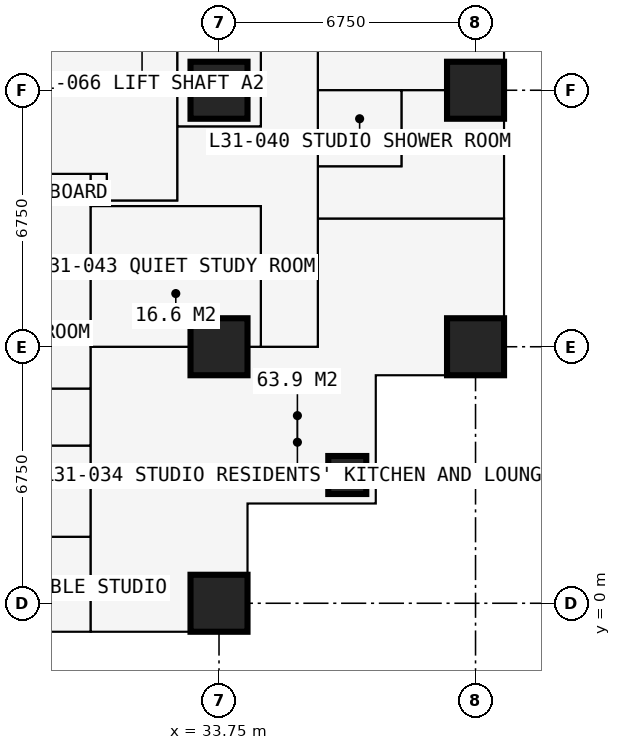
"""IFC4 building model, lengths in metres.
Left out: names, types, materials, properties, quantities, classifications, styles, units other than length and angle.
Written with IfcOpenShell. Run it as: python <this file> out.ifc"""

import sys

from ifc_helpers import new_model, si_unit, direction, frame, frame_2d, origin, origin_2d, place, context, subcontext, project, spatial, rectangle, extrude, element, fill, save


model = new_model("IFC4")
c1 = context("Model", 3, precision=1e-05, world=origin(), true_north=direction((0.0, 1.0)))
c2 = subcontext(c1, "Body", "Model", "MODEL_VIEW")
j1 = project(units=[si_unit("LENGTHUNIT", "METRE"), si_unit("PLANEANGLEUNIT", "RADIAN")], contexts=[c1])
p1 = place(None, origin())
s1 = spatial("IfcSite", under=j1, at=p1, CompositionType="ELEMENT")
p2 = place(p1, origin())
s2 = spatial("IfcBuilding", under=s1, at=p2, CompositionType="ELEMENT")
p3 = place(p2, frame((0.0, 0.0, 116.1)))
s3 = spatial("IfcBuildingStorey", under=s2, at=p3, CompositionType="ELEMENT", Elevation=116.1)
for number, where, z_axis, x_axis in (
    (1, (33.75, 0.0, 0.0), (0.0, 0.0, 1.0), (1.0, 0.0, 0.0)),
    (2, (33.75, 6.75, 0.0), (0.0, 0.0, 1.0), (1.0, 0.0, 0.0)),
    (3, (33.75, 13.5, 0.0), (0.0, 0.0, 1.0), (1.0, 0.0, 0.0)),
):
    element("IfcColumn", number, at=place(p3, frame(where, z_axis=z_axis, x_axis=x_axis)), inside=s3, PredefinedType="COLUMN", context=c2, shape_type="SweptSolid", body=[
        extrude(rectangle(XDim=1.5, YDim=1.5, at=origin_2d()), origin(), (0.0, 0.0, 1.0), 3.6),
    ])
p4 = place(p3, frame((37.125, 3.375, 0.0), z_axis=(0.0, 0.0, 1.0), x_axis=(1.0, 0.0, 0.0)))
e4 = element("IfcColumn", 4, at=p4, inside=s3, PredefinedType="COLUMN", context=c2, shape_type="SweptSolid", body=[
    extrude(rectangle(XDim=1.0, YDim=1.0, at=origin_2d()), origin(), (0.0, 0.0, 1.0), 3.6),
])
for number, where, z_axis, x_axis in (
    (5, (40.5, 6.75, 0.0), (0.0, 0.0, 1.0), (1.0, 0.0, 0.0)),
    (6, (40.5, 13.5, 0.0), (0.0, 0.0, 1.0), (1.0, 0.0, 0.0)),
):
    element("IfcColumn", number, at=place(p3, frame(where, z_axis=z_axis, x_axis=x_axis)), inside=s3, PredefinedType="COLUMN", context=c2, shape_type="SweptSolid", body=[
        extrude(rectangle(XDim=1.5, YDim=1.5, at=origin_2d()), origin(), (0.0, 0.0, 1.0), 3.6),
    ])
p5 = place(p3, frame((41.25, 20.25, 0.0), z_axis=(0.0, 0.0, 1.0), x_axis=(0.0, -1.0, 0.0)))
e7 = element("IfcWall", 7, at=p5, inside=s3, PredefinedType="SOLIDWALL", context=c2, shape_type="SweptSolid", body=[
    extrude(rectangle(XDim=6.75, YDim=0.15, at=frame_2d((3.375, 0.0))), origin(), (0.0, 0.0, 1.0), 3.375),
])
p6 = place(p5, frame((0.863, 0.0, 0.0)))
e8 = element("IfcOpeningElement", 8, at=p6, cuts=e7, PredefinedType="OPENING", context=c2, shape_type="SweptSolid", body=[
    extrude(rectangle(XDim=1.0, YDim=2.2, at=frame_2d((0.5, 1.1))), frame((0.0, 0.085, 0.0), z_axis=(0.0, -1.0, 0.0), x_axis=(1.0, 0.0, 0.0)), (0.0, 0.0, 1.0), 0.17),
])
p7 = place(p5, frame((1.975, 0.0, 0.9)))
e9 = element("IfcOpeningElement", 9, at=p7, cuts=e7, PredefinedType="OPENING", context=c2, shape_type="SweptSolid", body=[
    extrude(rectangle(XDim=1.2, YDim=1.8, at=frame_2d((0.6, 0.9))), frame((0.0, 0.085, 0.0), z_axis=(0.0, -1.0, 0.0), x_axis=(1.0, 0.0, 0.0)), (0.0, 0.0, 1.0), 0.17),
])
p8 = place(p5, frame((4.887, 0.0, 0.0)))
e10 = element("IfcOpeningElement", 10, at=p8, cuts=e7, PredefinedType="OPENING", context=c2, shape_type="SweptSolid", body=[
    extrude(rectangle(XDim=1.0, YDim=2.2, at=frame_2d((0.5, 1.1))), frame((0.0, 0.085, 0.0), z_axis=(0.0, -1.0, 0.0), x_axis=(1.0, 0.0, 0.0)), (0.0, 0.0, 1.0), 0.17),
])
p9 = place(p5, frame((3.575, 0.0, 0.9)))
e11 = element("IfcOpeningElement", 11, at=p9, cuts=e7, PredefinedType="OPENING", context=c2, shape_type="SweptSolid", body=[
    extrude(rectangle(XDim=1.2, YDim=1.8, at=frame_2d((0.6, 0.9))), frame((0.0, 0.085, 0.0), z_axis=(0.0, -1.0, 0.0), x_axis=(1.0, 0.0, 0.0)), (0.0, 0.0, 1.0), 0.17),
])
p10 = place(p3, frame((34.5, -0.75, 0.0), z_axis=(0.0, 0.0, 1.0), x_axis=(0.0, 1.0, 0.0)))
e12 = element("IfcWall", 12, at=p10, inside=s3, PredefinedType="SOLIDWALL", context=c2, shape_type="SweptSolid", body=[
    extrude(rectangle(XDim=3.375, YDim=0.3, at=frame_2d((1.688, 0.0))), origin(), (0.0, 0.0, 1.0), 3.375),
])
p11 = place(p10, frame((1.607, 0.0, 0.9)))
e13 = element("IfcOpeningElement", 13, at=p11, cuts=e12, PredefinedType="OPENING", context=c2, shape_type="SweptSolid", body=[
    extrude(rectangle(XDim=1.5, YDim=1.8, at=frame_2d((0.75, 0.9))), frame((0.0, 0.16, 0.0), z_axis=(0.0, -1.0, 0.0), x_axis=(1.0, 0.0, 0.0)), (0.0, 0.0, 1.0), 0.32),
])
p12 = place(p3, frame((34.5, 2.625, 0.0), z_axis=(0.0, 0.0, 1.0), x_axis=(1.0, 0.0, 0.0)))
e14 = element("IfcWall", 14, at=p12, inside=s3, PredefinedType="SOLIDWALL", context=c2, shape_type="SweptSolid", body=[
    extrude(rectangle(XDim=3.375, YDim=0.3, at=frame_2d((1.688, 0.0))), origin(), (0.0, 0.0, 1.0), 3.375),
])
p13 = place(p12, frame((0.788, 0.0, 0.6)))
e15 = element("IfcOpeningElement", 15, at=p13, cuts=e14, PredefinedType="OPENING", context=c2, shape_type="SweptSolid", body=[
    extrude(rectangle(XDim=1.8, YDim=2.1, at=frame_2d((0.9, 1.05))), frame((0.0, 0.16, 0.0), z_axis=(0.0, -1.0, 0.0), x_axis=(1.0, 0.0, 0.0)), (0.0, 0.0, 1.0), 0.32),
])
p14 = place(p3, frame((37.875, 2.625, 0.0), z_axis=(0.0, 0.0, 1.0), x_axis=(0.0, 1.0, 0.0)))
e16 = element("IfcWall", 16, at=p14, inside=s3, PredefinedType="SOLIDWALL", context=c2, shape_type="SweptSolid", body=[
    extrude(rectangle(XDim=3.375, YDim=0.3, at=frame_2d((1.688, 0.0))), origin(), (0.0, 0.0, 1.0), 3.375),
])
p15 = place(p14, frame((0.788, 0.0, 0.6)))
e17 = element("IfcOpeningElement", 17, at=p15, cuts=e16, PredefinedType="OPENING", context=c2, shape_type="SweptSolid", body=[
    extrude(rectangle(XDim=1.8, YDim=2.1, at=frame_2d((0.9, 1.05))), frame((0.0, 0.16, 0.0), z_axis=(0.0, -1.0, 0.0), x_axis=(1.0, 0.0, 0.0)), (0.0, 0.0, 1.0), 0.32),
])
p16 = place(p3, frame((37.875, 6.0, 0.0), z_axis=(0.0, 0.0, 1.0), x_axis=(1.0, 0.0, 0.0)))
e18 = element("IfcWall", 18, at=p16, inside=s3, PredefinedType="SOLIDWALL", context=c2, shape_type="SweptSolid", body=[
    extrude(rectangle(XDim=3.375, YDim=0.3, at=frame_2d((1.688, 0.0))), origin(), (0.0, 0.0, 1.0), 3.375),
])
p17 = place(p16, frame((0.268, 0.0, 0.9)))
e19 = element("IfcOpeningElement", 19, at=p17, cuts=e18, PredefinedType="OPENING", context=c2, shape_type="SweptSolid", body=[
    extrude(rectangle(XDim=1.5, YDim=1.8, at=frame_2d((0.75, 0.9))), frame((0.0, 0.16, 0.0), z_axis=(0.0, -1.0, 0.0), x_axis=(1.0, 0.0, 0.0)), (0.0, 0.0, 1.0), 0.32),
])
p18 = place(p3, frame((6.75, 4.15, 0.0), z_axis=(0.0, 0.0, 1.0), x_axis=(1.0, 0.0, 0.0)))
e20 = element("IfcWall", 20, at=p18, inside=s3, PredefinedType="PARTITIONING", context=c2, shape_type="SweptSolid", body=[
    extrude(rectangle(XDim=23.625, YDim=0.1, at=frame_2d((11.812, 0.0))), origin(), (0.0, 0.0, 1.0), 3.375),
])
p19 = place(p18, frame((0.2, 0.0, 0.0)))
e21 = element("IfcOpeningElement", 21, at=p19, cuts=e20, PredefinedType="OPENING", context=c2, shape_type="SweptSolid", body=[
    extrude(rectangle(XDim=0.95, YDim=2.2, at=frame_2d((0.475, 1.1))), frame((0.0, 0.06, 0.0), z_axis=(0.0, -1.0, 0.0), x_axis=(1.0, 0.0, 0.0)), (0.0, 0.0, 1.0), 0.12),
])
p20 = place(p18, frame((3.625, 0.0, 0.0)))
e22 = element("IfcOpeningElement", 22, at=p20, cuts=e20, PredefinedType="OPENING", context=c2, shape_type="SweptSolid", body=[
    extrude(rectangle(XDim=0.95, YDim=2.2, at=frame_2d((0.475, 1.1))), frame((0.0, 0.06, 0.0), z_axis=(0.0, -1.0, 0.0), x_axis=(1.0, 0.0, 0.0)), (0.0, 0.0, 1.0), 0.12),
])
p21 = place(p18, frame((7.0, 0.0, 0.0)))
e23 = element("IfcOpeningElement", 23, at=p21, cuts=e20, PredefinedType="OPENING", context=c2, shape_type="SweptSolid", body=[
    extrude(rectangle(XDim=0.95, YDim=2.2, at=frame_2d((0.475, 1.1))), frame((0.0, 0.06, 0.0), z_axis=(0.0, -1.0, 0.0), x_axis=(1.0, 0.0, 0.0)), (0.0, 0.0, 1.0), 0.12),
])
p22 = place(p18, frame((10.375, 0.0, 0.0)))
e24 = element("IfcOpeningElement", 24, at=p22, cuts=e20, PredefinedType="OPENING", context=c2, shape_type="SweptSolid", body=[
    extrude(rectangle(XDim=0.95, YDim=2.2, at=frame_2d((0.475, 1.1))), frame((0.0, 0.06, 0.0), z_axis=(0.0, -1.0, 0.0), x_axis=(1.0, 0.0, 0.0)), (0.0, 0.0, 1.0), 0.12),
])
p23 = place(p18, frame((18.475, 0.0, 0.0)))
e25 = element("IfcOpeningElement", 25, at=p23, cuts=e20, PredefinedType="OPENING", context=c2, shape_type="SweptSolid", body=[
    extrude(rectangle(XDim=0.95, YDim=2.2, at=frame_2d((0.475, 1.1))), frame((0.0, 0.06, 0.0), z_axis=(0.0, -1.0, 0.0), x_axis=(1.0, 0.0, 0.0)), (0.0, 0.0, 1.0), 0.12),
])
p24 = place(p18, frame((13.7, 0.0, 0.0)))
e26 = element("IfcOpeningElement", 26, at=p24, cuts=e20, PredefinedType="OPENING", context=c2, shape_type="SweptSolid", body=[
    extrude(rectangle(XDim=0.95, YDim=2.2, at=frame_2d((0.475, 1.1))), frame((0.0, 0.06, 0.0), z_axis=(0.0, -1.0, 0.0), x_axis=(1.0, 0.0, 0.0)), (0.0, 0.0, 1.0), 0.12),
])
p25 = place(p3, frame((10.125, 11.3, 0.0), z_axis=(0.0, 0.0, 1.0), x_axis=(1.0, 0.0, 0.0)))
e27 = element("IfcWall", 27, at=p25, inside=s3, PredefinedType="PARTITIONING", context=c2, shape_type="SweptSolid", body=[
    extrude(rectangle(XDim=20.675, YDim=0.15, at=frame_2d((10.337, 0.0))), origin(), (0.0, 0.0, 1.0), 3.375),
])
p26 = place(p25, frame((8.375, 0.0, 0.0)))
e28 = element("IfcOpeningElement", 28, at=p26, cuts=e27, PredefinedType="OPENING", context=c2, shape_type="SweptSolid", body=[
    extrude(rectangle(XDim=1.0, YDim=2.2, at=frame_2d((0.5, 1.1))), frame((0.0, 0.085, 0.0), z_axis=(0.0, -1.0, 0.0), x_axis=(1.0, 0.0, 0.0)), (0.0, 0.0, 1.0), 0.17),
])
p27 = place(p25, frame((10.975, 0.0, 0.0)))
e29 = element("IfcOpeningElement", 29, at=p27, cuts=e27, PredefinedType="OPENING", context=c2, shape_type="SweptSolid", body=[
    extrude(rectangle(XDim=1.0, YDim=2.2, at=frame_2d((0.5, 1.1))), frame((0.0, 0.085, 0.0), z_axis=(0.0, -1.0, 0.0), x_axis=(1.0, 0.0, 0.0)), (0.0, 0.0, 1.0), 0.17),
])
p28 = place(p25, frame((3.925, 0.0, 0.0)))
e30 = element("IfcOpeningElement", 30, at=p28, cuts=e27, PredefinedType="OPENING", context=c2, shape_type="SweptSolid", body=[
    extrude(rectangle(XDim=0.95, YDim=2.2, at=frame_2d((0.475, 1.1))), frame((0.0, 0.085, 0.0), z_axis=(0.0, -1.0, 0.0), x_axis=(1.0, 0.0, 0.0)), (0.0, 0.0, 1.0), 0.17),
])
p29 = place(p3, frame((22.988, 5.65, 0.0), z_axis=(0.0, 0.0, 1.0), x_axis=(1.0, 0.0, 0.0)))
e31 = element("IfcWall", 31, at=p29, inside=s3, PredefinedType="PARTITIONING", context=c2, shape_type="SweptSolid", body=[
    extrude(rectangle(XDim=7.387, YDim=0.15, at=frame_2d((3.694, 0.0))), origin(), (0.0, 0.0, 1.0), 3.375),
])
p30 = place(p29, frame((2.3, 0.0, 0.0)))
e32 = element("IfcOpeningElement", 32, at=p30, cuts=e31, PredefinedType="OPENING", context=c2, shape_type="SweptSolid", body=[
    extrude(rectangle(XDim=0.95, YDim=2.2, at=frame_2d((0.475, 1.1))), frame((0.0, 0.085, 0.0), z_axis=(0.0, -1.0, 0.0), x_axis=(1.0, 0.0, 0.0)), (0.0, 0.0, 1.0), 0.17),
])
p31 = place(p3, frame((27.775, 1.75, 0.0), z_axis=(0.0, 0.0, 1.0), x_axis=(1.0, 0.0, 0.0)))
e33 = element("IfcWall", 33, at=p31, inside=s3, PredefinedType="PARTITIONING", context=c2, shape_type="SweptSolid", body=[
    extrude(rectangle(XDim=2.6, YDim=0.1, at=frame_2d((1.3, 0.0))), origin(), (0.0, 0.0, 1.0), 3.375),
])
p32 = place(p31, frame((0.85, 0.0, 0.0)))
e34 = element("IfcOpeningElement", 34, at=p32, cuts=e33, PredefinedType="OPENING", context=c2, shape_type="SweptSolid", body=[
    extrude(rectangle(XDim=0.9, YDim=2.2, at=frame_2d((0.45, 1.1))), frame((0.0, 0.06, 0.0), z_axis=(0.0, -1.0, 0.0), x_axis=(1.0, 0.0, 0.0)), (0.0, 0.0, 1.0), 0.12),
])
p33 = place(p3, frame((30.375, -0.734, 0.0), z_axis=(0.0, 0.0, 1.0), x_axis=(0.0, 1.0, 0.0)))
e35 = element("IfcWall", 35, at=p33, inside=s3, PredefinedType="PARTITIONING", context=c2, shape_type="SweptSolid", body=[
    extrude(rectangle(XDim=12.034, YDim=0.15, at=frame_2d((6.017, 0.0))), origin(), (0.0, 0.0, 1.0), 3.375),
])
p34 = place(p33, frame((5.134, 0.0, 0.0)))
e36 = element("IfcOpeningElement", 36, at=p34, cuts=e35, PredefinedType="OPENING", context=c2, shape_type="SweptSolid", body=[
    extrude(rectangle(XDim=1.0, YDim=2.2, at=frame_2d((0.5, 1.1))), frame((0.0, 0.085, 0.0), z_axis=(0.0, -1.0, 0.0), x_axis=(1.0, 0.0, 0.0)), (0.0, 0.0, 1.0), 0.17),
])
p35 = place(p3, frame((30.375, 6.75, 0.0), z_axis=(0.0, 0.0, 1.0), x_axis=(1.0, 0.0, 0.0)))
e37 = element("IfcWall", 37, at=p35, inside=s3, PredefinedType="PARTITIONING", context=c2, shape_type="SweptSolid", body=[
    extrude(rectangle(XDim=5.975, YDim=0.15, at=frame_2d((2.988, 0.0))), origin(), (0.0, 0.0, 1.0), 2.877),
])
p36 = place(p3, frame((30.375, 10.45, 0.0), z_axis=(0.0, 0.0, 1.0), x_axis=(1.0, 0.0, 0.0)))
e38 = element("IfcWall", 38, at=p36, inside=s3, PredefinedType="PARTITIONING", context=c2, shape_type="SweptSolid", body=[
    extrude(rectangle(XDim=4.475, YDim=0.15, at=frame_2d((2.238, 0.0))), origin(), (0.0, 0.0, 1.0), 3.375),
])
p37 = place(p36, frame((2.35, 0.0, 0.0)))
e39 = element("IfcOpeningElement", 39, at=p37, cuts=e38, PredefinedType="OPENING", context=c2, shape_type="SweptSolid", body=[
    extrude(rectangle(XDim=0.95, YDim=2.2, at=frame_2d((0.475, 1.1))), frame((0.0, 0.085, 0.0), z_axis=(0.0, -1.0, 0.0), x_axis=(1.0, 0.0, 0.0)), (0.0, 0.0, 1.0), 0.17),
])
p38 = place(p3, frame((30.8, 10.6, 0.0), z_axis=(0.0, 0.0, 1.0), x_axis=(0.0, 1.0, 0.0)))
e40 = element("IfcWall", 40, at=p38, inside=s3, PredefinedType="PARTITIONING", context=c2, shape_type="SweptSolid", body=[
    extrude(rectangle(XDim=0.7, YDim=0.15, at=frame_2d((0.35, 0.0))), origin(), (0.0, 0.0, 1.0), 3.375),
])
p39 = place(p3, frame((30.8, 10.6, 0.0), z_axis=(0.0, 0.0, 1.0), x_axis=(1.0, 0.0, 0.0)))
e41 = element("IfcWall", 41, at=p39, inside=s3, PredefinedType="PARTITIONING", context=c2, shape_type="SweptSolid", body=[
    extrude(rectangle(XDim=1.85, YDim=0.15, at=frame_2d((0.925, 0.0))), origin(), (0.0, 0.0, 1.0), 3.375),
])
p40 = place(p3, frame((32.65, 10.6, 0.0), z_axis=(0.0, 0.0, 1.0), x_axis=(0.0, 1.0, 0.0)))
e42 = element("IfcWall", 42, at=p40, inside=s3, PredefinedType="SHEAR", context=c2, shape_type="SweptSolid", body=[
    extrude(rectangle(XDim=9.3, YDim=0.1, at=frame_2d((4.65, 0.0))), origin(), (0.0, 0.0, 1.0), 3.375),
])
p41 = place(p40, frame((0.5, 0.0, 0.0)))
e43 = element("IfcOpeningElement", 43, at=p41, cuts=e42, PredefinedType="OPENING", context=c2, shape_type="SweptSolid", body=[
    extrude(rectangle(XDim=1.0, YDim=2.2, at=frame_2d((0.5, 1.1))), frame((0.0, 0.06, 0.0), z_axis=(0.0, -1.0, 0.0), x_axis=(1.0, 0.0, 0.0)), (0.0, 0.0, 1.0), 0.12),
])
p42 = place(p3, frame((32.65, 12.55, 0.0), z_axis=(0.0, 0.0, 1.0), x_axis=(1.0, 0.0, 0.0)))
e44 = element("IfcWall", 44, at=p42, inside=s3, PredefinedType="PARTITIONING", context=c2, shape_type="SweptSolid", body=[
    extrude(rectangle(XDim=2.2, YDim=0.15, at=frame_2d((1.1, 0.0))), origin(), (0.0, 0.0, 1.0), 3.375),
])
p43 = place(p3, frame((34.85, 6.75, 0.0), z_axis=(0.0, 0.0, 1.0), x_axis=(0.0, 1.0, 0.0)))
e45 = element("IfcWall", 45, at=p43, inside=s3, PredefinedType="PARTITIONING", context=c2, shape_type="SweptSolid", body=[
    extrude(rectangle(XDim=3.7, YDim=0.15, at=frame_2d((1.85, 0.0))), origin(), (0.0, 0.0, 1.0), 3.375),
])
p44 = place(p3, frame((34.85, 12.55, 0.0), z_axis=(0.0, 0.0, 1.0), x_axis=(0.0, 1.0, 0.0)))
e46 = element("IfcWall", 46, at=p44, inside=s3, PredefinedType="PARTITIONING", context=c2, shape_type="SweptSolid", body=[
    extrude(rectangle(XDim=17.825, YDim=0.15, at=frame_2d((8.913, 0.0))), origin(), (0.0, 0.0, 1.0), 3.375),
])
p45 = place(p44, frame((8.5, 0.0, 0.0)))
e47 = element("IfcOpeningElement", 47, at=p45, cuts=e46, PredefinedType="OPENING", context=c2, shape_type="SweptSolid", body=[
    extrude(rectangle(XDim=0.95, YDim=2.2, at=frame_2d((0.475, 1.1))), frame((0.0, 0.085, 0.0), z_axis=(0.0, -1.0, 0.0), x_axis=(1.0, 0.0, 0.0)), (0.0, 0.0, 1.0), 0.17),
])
p46 = place(p3, frame((36.35, 6.75, 0.0), z_axis=(0.0, 0.0, 1.0), x_axis=(0.0, 1.0, 0.0)))
e48 = element("IfcWall", 48, at=p46, inside=s3, PredefinedType="PARTITIONING", context=c2, shape_type="SweptSolid", body=[
    extrude(rectangle(XDim=20.25, YDim=0.15, at=frame_2d((10.125, 0.0))), origin(), (0.0, 0.0, 1.0), 3.375),
])
p47 = place(p46, frame((15.1, 0.0, 0.0)))
e49 = element("IfcOpeningElement", 49, at=p47, cuts=e48, PredefinedType="OPENING", context=c2, shape_type="SweptSolid", body=[
    extrude(rectangle(XDim=0.95, YDim=2.2, at=frame_2d((0.475, 1.1))), frame((0.0, 0.085, 0.0), z_axis=(0.0, -1.0, 0.0), x_axis=(1.0, 0.0, 0.0)), (0.0, 0.0, 1.0), 0.17),
])
p48 = place(p46, frame((8.35, 0.0, 0.0)))
e50 = element("IfcOpeningElement", 50, at=p48, cuts=e48, PredefinedType="OPENING", context=c2, shape_type="SweptSolid", body=[
    extrude(rectangle(XDim=0.95, YDim=2.2, at=frame_2d((0.475, 1.1))), frame((0.0, 0.085, 0.0), z_axis=(0.0, -1.0, 0.0), x_axis=(1.0, 0.0, 0.0)), (0.0, 0.0, 1.0), 0.17),
])
p49 = place(p46, frame((3.575, 0.0, 0.0)))
e51 = element("IfcOpeningElement", 51, at=p49, cuts=e48, PredefinedType="OPENING", context=c2, shape_type="SweptSolid", body=[
    extrude(rectangle(XDim=0.95, YDim=2.2, at=frame_2d((0.475, 1.1))), frame((0.0, 0.085, 0.0), z_axis=(0.0, -1.0, 0.0), x_axis=(1.0, 0.0, 0.0)), (0.0, 0.0, 1.0), 0.17),
])
p50 = place(p3, frame((36.35, 10.125, 0.0), z_axis=(0.0, 0.0, 1.0), x_axis=(1.0, 0.0, 0.0)))
e52 = element("IfcWall", 52, at=p50, inside=s3, PredefinedType="PARTITIONING", context=c2, shape_type="SweptSolid", body=[
    extrude(rectangle(XDim=4.884, YDim=0.15, at=frame_2d((2.442, 0.0))), origin(), (0.0, 0.0, 1.0), 3.375),
])
p51 = place(p3, frame((36.35, 11.5, 0.0), z_axis=(0.0, 0.0, 1.0), x_axis=(1.0, 0.0, 0.0)))
e53 = element("IfcWall", 53, at=p51, inside=s3, PredefinedType="PARTITIONING", context=c2, shape_type="SweptSolid", body=[
    extrude(rectangle(XDim=2.2, YDim=0.1, at=frame_2d((1.1, 0.0))), origin(), (0.0, 0.0, 1.0), 3.375),
])
p52 = place(p3, frame((36.35, 13.5, 0.0), z_axis=(0.0, 0.0, 1.0), x_axis=(1.0, 0.0, 0.0)))
e54 = element("IfcWall", 54, at=p52, inside=s3, PredefinedType="PARTITIONING", context=c2, shape_type="SweptSolid", body=[
    extrude(rectangle(XDim=4.884, YDim=0.175, at=frame_2d((2.442, 0.0))), origin(), (0.0, 0.0, 1.0), 2.877),
])
p53 = place(p52, frame((0.65, 0.0, 0.0)))
e55 = element("IfcOpeningElement", 55, at=p53, cuts=e54, PredefinedType="OPENING", context=c2, shape_type="SweptSolid", body=[
    extrude(rectangle(XDim=0.9, YDim=2.2, at=frame_2d((0.45, 1.1))), frame((0.0, 0.097, 0.0), z_axis=(0.0, -1.0, 0.0), x_axis=(1.0, 0.0, 0.0)), (0.0, 0.0, 1.0), 0.195),
])
p54 = place(p3, frame((38.55, 11.5, 0.0), z_axis=(0.0, 0.0, 1.0), x_axis=(0.0, 1.0, 0.0)))
e56 = element("IfcWall", 56, at=p54, inside=s3, PredefinedType="PARTITIONING", context=c2, shape_type="SweptSolid", body=[
    extrude(rectangle(XDim=2.0, YDim=0.1, at=frame_2d((1.0, 0.0))), origin(), (0.0, 0.0, 1.0), 3.375),
])
p55 = place(p8, origin())
e57 = element("IfcDoor", 57, at=p55, inside=s3, OperationType="SINGLE_SWING_RIGHT", PredefinedType="DOOR", context=c2, shape_type="SweptSolid", body=[
    extrude(rectangle(XDim=1.0, YDim=2.2, at=frame_2d((0.5, 1.1))), frame((0.0, 0.025, 0.0), z_axis=(0.0, -1.0, 0.0), x_axis=(1.0, 0.0, 0.0)), (0.0, 0.0, 1.0), 0.05),
])
fill(e10, e57)
p56 = place(p11, origin())
e58 = element("IfcWindow", 58, at=p56, inside=s3, PartitioningType="SINGLE_PANEL", PredefinedType="WINDOW", context=c2, shape_type="SweptSolid", body=[
    extrude(rectangle(XDim=1.5, YDim=1.8, at=frame_2d((0.75, 0.9))), frame((0.0, 0.03, 0.0), z_axis=(0.0, -1.0, 0.0), x_axis=(1.0, 0.0, 0.0)), (0.0, 0.0, 1.0), 0.06),
])
fill(e13, e58)
p57 = place(p13, origin())
e59 = element("IfcWindow", 59, at=p57, inside=s3, PartitioningType="SINGLE_PANEL", PredefinedType="WINDOW", context=c2, shape_type="SweptSolid", body=[
    extrude(rectangle(XDim=1.8, YDim=2.1, at=frame_2d((0.9, 1.05))), frame((0.0, 0.03, 0.0), z_axis=(0.0, -1.0, 0.0), x_axis=(1.0, 0.0, 0.0)), (0.0, 0.0, 1.0), 0.06),
])
fill(e15, e59)
p58 = place(p15, origin())
e60 = element("IfcWindow", 60, at=p58, inside=s3, PartitioningType="SINGLE_PANEL", PredefinedType="WINDOW", context=c2, shape_type="SweptSolid", body=[
    extrude(rectangle(XDim=1.8, YDim=2.1, at=frame_2d((0.9, 1.05))), frame((0.0, 0.03, 0.0), z_axis=(0.0, -1.0, 0.0), x_axis=(1.0, 0.0, 0.0)), (0.0, 0.0, 1.0), 0.06),
])
fill(e17, e60)
p59 = place(p17, origin())
e61 = element("IfcWindow", 61, at=p59, inside=s3, PartitioningType="SINGLE_PANEL", PredefinedType="WINDOW", context=c2, shape_type="SweptSolid", body=[
    extrude(rectangle(XDim=1.5, YDim=1.8, at=frame_2d((0.75, 0.9))), frame((0.0, 0.03, 0.0), z_axis=(0.0, -1.0, 0.0), x_axis=(1.0, 0.0, 0.0)), (0.0, 0.0, 1.0), 0.06),
])
fill(e19, e61)
p60 = place(p32, origin())
e62 = element("IfcDoor", 62, at=p60, inside=s3, OperationType="SINGLE_SWING_RIGHT", PredefinedType="DOOR", context=c2, shape_type="SweptSolid", body=[
    extrude(rectangle(XDim=0.9, YDim=2.2, at=frame_2d((0.45, 1.1))), frame((0.0, 0.025, 0.0), z_axis=(0.0, -1.0, 0.0), x_axis=(1.0, 0.0, 0.0)), (0.0, 0.0, 1.0), 0.05),
])
fill(e34, e62)
p61 = place(p34, origin())
e63 = element("IfcDoor", 63, at=p61, inside=s3, OperationType="SINGLE_SWING_LEFT", PredefinedType="DOOR", context=c2, shape_type="SweptSolid", body=[
    extrude(rectangle(XDim=1.0, YDim=2.2, at=frame_2d((0.5, 1.1))), frame((0.0, 0.025, 0.0), z_axis=(0.0, -1.0, 0.0), x_axis=(1.0, 0.0, 0.0)), (0.0, 0.0, 1.0), 0.05),
])
fill(e36, e63)
p62 = place(p49, origin())
e64 = element("IfcDoor", 64, at=p62, inside=s3, OperationType="SINGLE_SWING_LEFT", PredefinedType="DOOR", context=c2, shape_type="SweptSolid", body=[
    extrude(rectangle(XDim=0.95, YDim=2.2, at=frame_2d((0.475, 1.1))), frame((0.0, 0.025, 0.0), z_axis=(0.0, -1.0, 0.0), x_axis=(1.0, 0.0, 0.0)), (0.0, 0.0, 1.0), 0.05),
])
fill(e51, e64)
p63 = place(p53, origin())
e65 = element("IfcDoor", 65, at=p63, inside=s3, OperationType="SINGLE_SWING_RIGHT", PredefinedType="DOOR", context=c2, shape_type="SweptSolid", body=[
    extrude(rectangle(XDim=0.9, YDim=2.2, at=frame_2d((0.45, 1.1))), frame((0.0, 0.025, 0.0), z_axis=(0.0, -1.0, 0.0), x_axis=(1.0, 0.0, 0.0)), (0.0, 0.0, 1.0), 0.05),
])
fill(e55, e65)
p64 = place(p41, origin())
e66 = element("IfcDoor", 66, at=p64, inside=s3, OperationType="SINGLE_SWING_LEFT", PredefinedType="DOOR", context=c2, shape_type="SweptSolid", body=[
    extrude(rectangle(XDim=1.0, YDim=2.2, at=frame_2d((0.5, 1.1))), frame((0.0, 0.025, 0.0), z_axis=(0.0, -1.0, 0.0), x_axis=(1.0, 0.0, 0.0)), (0.0, 0.0, 1.0), 0.05),
])
fill(e43, e66)
p65 = place(p37, origin())
e67 = element("IfcDoor", 67, at=p65, inside=s3, OperationType="SINGLE_SWING_LEFT", PredefinedType="DOOR", context=c2, shape_type="SweptSolid", body=[
    extrude(rectangle(XDim=0.95, YDim=2.2, at=frame_2d((0.475, 1.1))), frame((0.0, 0.025, 0.0), z_axis=(0.0, -1.0, 0.0), x_axis=(1.0, 0.0, 0.0)), (0.0, 0.0, 1.0), 0.05),
])
fill(e39, e67)
save(model, sys.argv[1])
